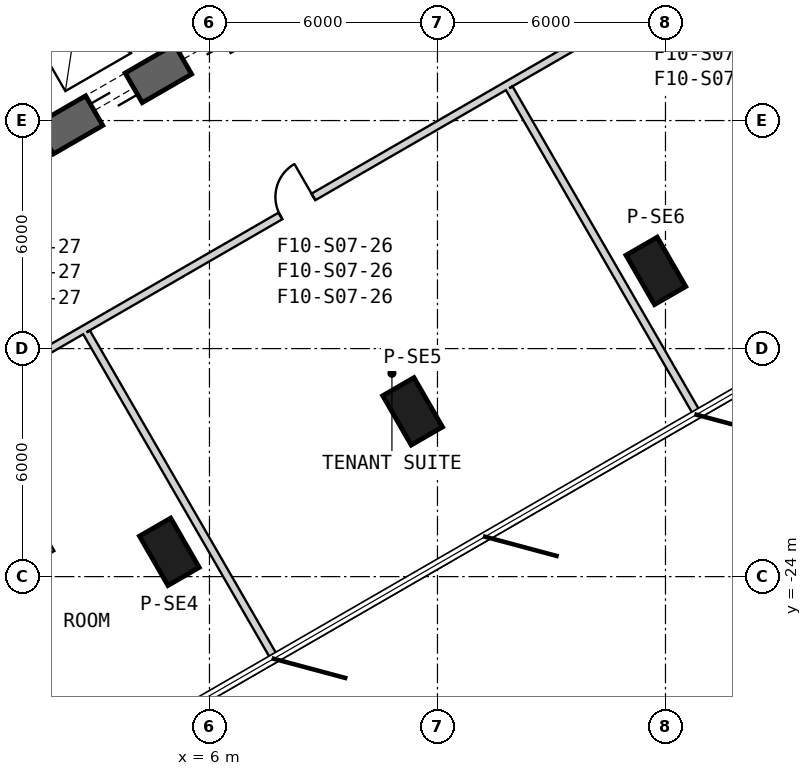
"""IFC4 building model, lengths in metres.
Left out: names, types, materials, properties, quantities, classifications, styles, units other than length and angle.
Written with IfcOpenShell. Run it as: python <this file> out.ifc"""

import sys

from ifc_helpers import new_model, si_unit, direction, frame, frame_2d, origin, origin_2d, place, context, subcontext, project, spatial, rectangle, extrude, element, fill, save


model = new_model("IFC4")
c1 = context("Model", 3, precision=1e-05, world=origin(), true_north=direction((0.0, 1.0)))
c2 = subcontext(c1, "Body", "Model", "MODEL_VIEW")
j1 = project(units=[si_unit("LENGTHUNIT", "METRE"), si_unit("PLANEANGLEUNIT", "RADIAN")], contexts=[c1])
p1 = place(None, origin())
s1 = spatial("IfcSite", under=j1, at=p1, CompositionType="ELEMENT")
p2 = place(p1, origin())
s2 = spatial("IfcBuilding", under=s1, at=p2, CompositionType="ELEMENT")
p3 = place(p2, frame((0.0, 0.0, 131.6)))
s3 = spatial("IfcBuildingStorey", under=s2, at=p3, CompositionType="ELEMENT", Elevation=131.6)
for number, where, z_axis, x_axis in (
    (1, (4.945, -23.347, 0.0), (0.0, 0.0, 1.0), (0.5, -0.866, 0.0)),
    (2, (11.346, -19.651, 0.0), (0.0, 0.0, 1.0), (0.5, -0.866, 0.0)),
    (3, (17.747, -15.956, 0.0), (0.0, 0.0, 1.0), (0.5, -0.866, 0.0)),
):
    element("IfcColumn", number, at=place(p3, frame(where, z_axis=z_axis, x_axis=x_axis)), inside=s3, PredefinedType="COLUMN", context=c2, shape_type="SweptSolid", body=[
        extrude(rectangle(XDim=1.5, YDim=0.95, at=origin_2d()), origin(), (0.0, 0.0, 1.0), 4.1),
    ])
p4 = place(p3, frame((-7.825, -17.97, 0.0), z_axis=(0.0, 0.0, 1.0), x_axis=(0.866028369851, 0.499994862586, 0.0)))
e4 = element("IfcWall", 4, at=p4, inside=s3, PredefinedType="SHEAR", context=c2, shape_type="SweptSolid", body=[
    extrude(rectangle(XDim=31.523, YDim=0.9, at=frame_2d((15.762, 0.0))), origin(), (0.0, 0.0, 1.0), 4.1),
])
p5 = place(p4, frame((7.062, 0.0, 0.0)))
e5 = element("IfcOpeningElement", 5, at=p5, cuts=e4, PredefinedType="OPENING", context=c2, shape_type="SweptSolid", body=[
    extrude(rectangle(XDim=1.2, YDim=2.4, at=frame_2d((0.6, 1.2))), frame((0.0, 0.46, 0.0), z_axis=(0.0, -1.0, 0.0), x_axis=(1.0, 0.0, 0.0)), (0.0, 0.0, 1.0), 0.92),
])
p6 = place(p4, frame((9.762, 0.0, 0.0)))
e6 = element("IfcOpeningElement", 6, at=p6, cuts=e4, PredefinedType="OPENING", context=c2, shape_type="SweptSolid", body=[
    extrude(rectangle(XDim=1.2, YDim=2.4, at=frame_2d((0.6, 1.2))), frame((0.0, 0.46, 0.0), z_axis=(0.0, -1.0, 0.0), x_axis=(1.0, 0.0, 0.0)), (0.0, 0.0, 1.0), 0.92),
])
p7 = place(p4, frame((12.462, 0.0, 0.0)))
e7 = element("IfcOpeningElement", 7, at=p7, cuts=e4, PredefinedType="OPENING", context=c2, shape_type="SweptSolid", body=[
    extrude(rectangle(XDim=1.2, YDim=2.4, at=frame_2d((0.6, 1.2))), frame((0.0, 0.46, 0.0), z_axis=(0.0, -1.0, 0.0), x_axis=(1.0, 0.0, 0.0)), (0.0, 0.0, 1.0), 0.92),
])
p8 = place(p4, frame((15.162, 0.0, 0.0)))
e8 = element("IfcOpeningElement", 8, at=p8, cuts=e4, PredefinedType="OPENING", context=c2, shape_type="SweptSolid", body=[
    extrude(rectangle(XDim=1.2, YDim=2.4, at=frame_2d((0.6, 1.2))), frame((0.0, 0.46, 0.0), z_axis=(0.0, -1.0, 0.0), x_axis=(1.0, 0.0, 0.0)), (0.0, 0.0, 1.0), 0.92),
])
p9 = place(p4, frame((17.862, 0.0, 0.0)))
e9 = element("IfcOpeningElement", 9, at=p9, cuts=e4, PredefinedType="OPENING", context=c2, shape_type="SweptSolid", body=[
    extrude(rectangle(XDim=1.2, YDim=2.4, at=frame_2d((0.6, 1.2))), frame((0.0, 0.46, 0.0), z_axis=(0.0, -1.0, 0.0), x_axis=(1.0, 0.0, 0.0)), (0.0, 0.0, 1.0), 0.92),
])
p10 = place(p4, frame((20.562, 0.0, 0.0)))
e10 = element("IfcOpeningElement", 10, at=p10, cuts=e4, PredefinedType="OPENING", context=c2, shape_type="SweptSolid", body=[
    extrude(rectangle(XDim=1.2, YDim=2.4, at=frame_2d((0.6, 1.2))), frame((0.0, 0.46, 0.0), z_axis=(0.0, -1.0, 0.0), x_axis=(1.0, 0.0, 0.0)), (0.0, 0.0, 1.0), 0.92),
])
p11 = place(p4, frame((26.712, 0.0, 0.0)))
e11 = element("IfcOpeningElement", 11, at=p11, cuts=e4, PredefinedType="OPENING", context=c2, shape_type="SweptSolid", body=[
    extrude(rectangle(XDim=1.2, YDim=2.4, at=frame_2d((0.6, 1.2))), frame((0.0, 0.46, 0.0), z_axis=(0.0, -1.0, 0.0), x_axis=(1.0, 0.0, 0.0)), (0.0, 0.0, 1.0), 0.92),
])
p12 = place(p4, frame((3.612, 0.0, 0.0)))
e12 = element("IfcOpeningElement", 12, at=p12, cuts=e4, PredefinedType="OPENING", context=c2, shape_type="SweptSolid", body=[
    extrude(rectangle(XDim=1.2, YDim=2.4, at=frame_2d((0.6, 1.2))), frame((0.0, 0.46, 0.0), z_axis=(0.0, -1.0, 0.0), x_axis=(1.0, 0.0, 0.0)), (0.0, 0.0, 1.0), 0.92),
])
p13 = place(p3, frame((-0.523, -19.354, 0.0), z_axis=(0.0, 0.0, 1.0), x_axis=(0.866024925705, 0.500000828058, 0.0)))
e13 = element("IfcWall", 13, at=p13, inside=s3, PredefinedType="PARTITIONING", context=c2, shape_type="SweptSolid", body=[
    extrude(rectangle(XDim=26.647, YDim=0.2, at=frame_2d((13.323, 0.0))), origin(), (0.0, 0.0, 1.0), 2.98),
])
p14 = place(p13, frame((21.145, 0.0, 0.0)))
e14 = element("IfcOpeningElement", 14, at=p14, cuts=e13, PredefinedType="OPENING", context=c2, shape_type="SweptSolid", body=[
    extrude(rectangle(XDim=1.0, YDim=2.1, at=frame_2d((0.5, 1.05))), frame((0.0, 0.11, 0.0), z_axis=(0.0, -1.0, 0.0), x_axis=(1.0, 0.0, 0.0)), (0.0, 0.0, 1.0), 0.22),
])
p15 = place(p13, frame((9.691, 0.0, 0.0)))
e15 = element("IfcOpeningElement", 15, at=p15, cuts=e13, PredefinedType="OPENING", context=c2, shape_type="SweptSolid", body=[
    extrude(rectangle(XDim=1.0, YDim=2.1, at=frame_2d((0.5, 1.05))), frame((0.0, 0.11, 0.0), z_axis=(0.0, -1.0, 0.0), x_axis=(1.0, 0.0, 0.0)), (0.0, 0.0, 1.0), 0.22),
])
p16 = place(p13, frame((1.369, 0.0, 0.0)))
e16 = element("IfcOpeningElement", 16, at=p16, cuts=e13, PredefinedType="OPENING", context=c2, shape_type="SweptSolid", body=[
    extrude(rectangle(XDim=1.0, YDim=2.1, at=frame_2d((0.5, 1.05))), frame((0.0, 0.11, 0.0), z_axis=(0.0, -1.0, 0.0), x_axis=(1.0, 0.0, 0.0)), (0.0, 0.0, 1.0), 0.22),
])
p17 = place(p3, frame((13.888, -11.15, 0.0), z_axis=(0.0, 0.0, 1.0), x_axis=(0.499931641511, -0.86606486698, 0.0)))
e17 = element("IfcWall", 17, at=p17, inside=s3, PredefinedType="PARTITIONING", context=c2, shape_type="SweptSolid", body=[
    extrude(rectangle(XDim=9.901, YDim=0.2, at=frame_2d((4.95, 0.0))), origin(), (0.0, 0.0, 1.0), 3.08),
])
p18 = place(p3, frame((7.714, -26.146, 0.0), z_axis=(0.0, 0.0, 1.0), x_axis=(-0.499926679301, 0.866067731372, 0.0)))
e18 = element("IfcWall", 18, at=p18, inside=s3, PredefinedType="PARTITIONING", context=c2, shape_type="SweptSolid", body=[
    extrude(rectangle(XDim=9.9, YDim=0.2, at=frame_2d((4.95, 0.0))), origin(), (0.0, 0.0, 1.0), 3.08),
])
p19 = place(p3, frame((1.87, -23.239, 0.0), z_axis=(0.0, 0.0, 1.0), x_axis=(-0.866020802127, -0.50000797022, 0.0)))
e19 = element("IfcWall", 19, at=p19, inside=s3, PredefinedType="PARTITIONING", context=c2, shape_type="SweptSolid", body=[
    extrude(rectangle(XDim=4.466, YDim=0.2, at=frame_2d((2.233, 0.0))), origin(), (0.0, 0.0, 1.0), 3.08),
])
p20 = place(p15, origin())
e20 = element("IfcDoor", 20, at=p20, inside=s3, OperationType="SINGLE_SWING_LEFT", PredefinedType="USERDEFINED", context=c2, shape_type="SweptSolid", body=[
    extrude(rectangle(XDim=1.0, YDim=2.1, at=frame_2d((0.5, 1.05))), frame((0.0, 0.025, 0.0), z_axis=(0.0, -1.0, 0.0), x_axis=(1.0, 0.0, 0.0)), (0.0, 0.0, 1.0), 0.05),
])
fill(e15, e20)
p21 = place(p7, origin())
e21 = element("IfcDoor", 21, at=p21, inside=s3, OperationType="SLIDING_TO_LEFT", PredefinedType="USERDEFINED", context=c2, shape_type="SweptSolid", body=[
    extrude(rectangle(XDim=1.2, YDim=2.4, at=frame_2d((0.6, 1.2))), frame((0.0, 0.025, 0.0), z_axis=(0.0, -1.0, 0.0), x_axis=(1.0, 0.0, 0.0)), (0.0, 0.0, 1.0), 0.05),
])
fill(e7, e21)
p22 = place(p8, origin())
e22 = element("IfcDoor", 22, at=p22, inside=s3, OperationType="SLIDING_TO_LEFT", PredefinedType="USERDEFINED", context=c2, shape_type="SweptSolid", body=[
    extrude(rectangle(XDim=1.2, YDim=2.4, at=frame_2d((0.6, 1.2))), frame((0.0, 0.025, 0.0), z_axis=(0.0, -1.0, 0.0), x_axis=(1.0, 0.0, 0.0)), (0.0, 0.0, 1.0), 0.05),
])
fill(e8, e22)
save(model, sys.argv[1])
